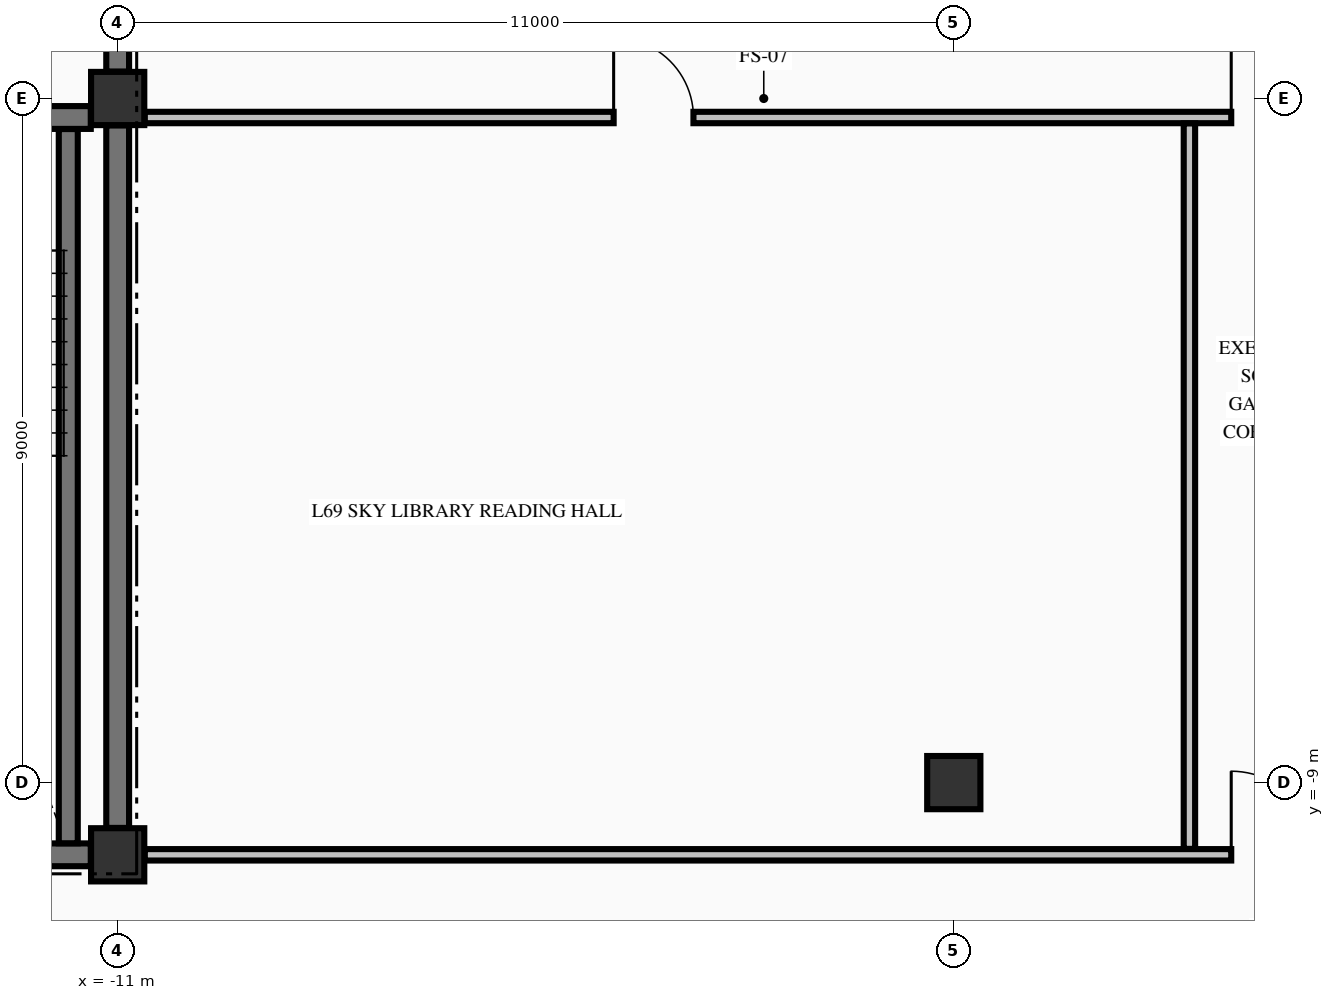
"""IFC4 building model, lengths in metres.
Left out: names, types, materials, properties, quantities, classifications, styles, units other than length and angle.
Written with IfcOpenShell. Run it as: python <this file> out.ifc"""

import sys

from ifc_helpers import new_model, si_unit, direction, frame, frame_2d, origin, origin_2d, place, context, subcontext, project, spatial, rectangle, extrude, element, fill, save


model = new_model("IFC4")
c1 = context("Model", 3, precision=1e-05, world=origin(), true_north=direction((0.0, 1.0)))
c2 = subcontext(c1, "Body", "Model", "MODEL_VIEW")
j1 = project(units=[si_unit("LENGTHUNIT", "METRE"), si_unit("PLANEANGLEUNIT", "RADIAN")], contexts=[c1])
p1 = place(None, origin())
s1 = spatial("IfcSite", under=j1, at=p1, CompositionType="ELEMENT")
p2 = place(p1, origin())
s2 = spatial("IfcBuilding", under=s1, at=p2, CompositionType="ELEMENT")
p3 = place(p2, frame((0.0, 0.0, 260.89)))
s3 = spatial("IfcBuildingStorey", under=s2, at=p3, CompositionType="ELEMENT", Elevation=260.89)
for number, where, z_axis, x_axis in (
    (1, (-11.0, -9.95, -0.25), (0.0, 0.0, 1.0), (1.0, 0.0, 0.0)),
    (2, (-11.0, 0.0, -0.25), (0.0, 0.0, 1.0), (1.0, 0.0, 0.0)),
    (3, (0.0, -9.0, -0.25), (0.0, 0.0, 1.0), (1.0, 0.0, 0.0)),
):
    element("IfcColumn", number, at=place(p3, frame(where, z_axis=z_axis, x_axis=x_axis)), inside=s3, PredefinedType="COLUMN", context=c2, shape_type="SweptSolid", body=[
        extrude(rectangle(XDim=0.7, YDim=0.7, at=origin_2d()), origin(), (0.0, 0.0, 1.0), 3.23),
    ])
p4 = place(p3, frame((-14.7, -9.95, 0.0), z_axis=(0.0, 0.0, 1.0), x_axis=(1.0, 0.0, 0.0)))
e4 = element("IfcWall", 4, at=p4, inside=s3, PredefinedType="SHEAR", context=c2, shape_type="SweptSolid", body=[
    extrude(rectangle(XDim=3.346, YDim=0.3, at=frame_2d((1.673, 0.0))), origin(), (0.0, 0.0, 1.0), 2.98),
])
p5 = place(p3, frame((-19.646, -0.25, 0.0), z_axis=(0.0, 0.0, 1.0), x_axis=(1.0, 0.0, 0.0)))
e5 = element("IfcWall", 5, at=p5, inside=s3, PredefinedType="SHEAR", context=c2, shape_type="SweptSolid", body=[
    extrude(rectangle(XDim=8.292, YDim=0.3, at=frame_2d((4.146, 0.0))), origin(), (0.0, 0.0, 1.0), 2.98),
])
p6 = place(p5, frame((5.946, 0.0, 0.0)))
e6 = element("IfcOpeningElement", 6, at=p6, cuts=e5, PredefinedType="OPENING", context=c2, shape_type="SweptSolid", body=[
    extrude(rectangle(XDim=1.1, YDim=2.15, at=frame_2d((0.55, 1.075))), frame((0.0, 0.16, 0.0), z_axis=(0.0, -1.0, 0.0), x_axis=(1.0, 0.0, 0.0)), (0.0, 0.0, 1.0), 0.32),
])
p7 = place(p3, frame((-10.644, -9.95, 0.0), z_axis=(0.0, 0.0, 1.0), x_axis=(1.0, 0.0, 0.0)))
e7 = element("IfcWall", 7, at=p7, inside=s3, PredefinedType="PARTITIONING", context=c2, shape_type="SweptSolid", body=[
    extrude(rectangle(XDim=21.288, YDim=0.15, at=frame_2d((10.644, 0.0))), origin(), (0.0, 0.0, 1.0), 2.98),
])
p8 = place(p7, frame((14.294, 0.0, 0.0)))
e8 = element("IfcOpeningElement", 8, at=p8, cuts=e7, PredefinedType="OPENING", context=c2, shape_type="SweptSolid", body=[
    extrude(rectangle(XDim=1.1, YDim=2.15, at=frame_2d((0.55, 1.075))), frame((0.0, 0.085, 0.0), z_axis=(0.0, -1.0, 0.0), x_axis=(1.0, 0.0, 0.0)), (0.0, 0.0, 1.0), 0.17),
])
p9 = place(p7, frame((19.719, 0.0, 0.0)))
e9 = element("IfcOpeningElement", 9, at=p9, cuts=e7, PredefinedType="OPENING", context=c2, shape_type="SweptSolid", body=[
    extrude(rectangle(XDim=0.95, YDim=2.15, at=frame_2d((0.475, 1.075))), frame((0.0, 0.085, 0.0), z_axis=(0.0, -1.0, 0.0), x_axis=(1.0, 0.0, 0.0)), (0.0, 0.0, 1.0), 0.17),
])
p10 = place(p3, frame((-10.644, -0.25, 0.0), z_axis=(0.0, 0.0, 1.0), x_axis=(1.0, 0.0, 0.0)))
e10 = element("IfcWall", 10, at=p10, inside=s3, PredefinedType="PARTITIONING", context=c2, shape_type="SweptSolid", body=[
    extrude(rectangle(XDim=21.288, YDim=0.15, at=frame_2d((10.644, 0.0))), origin(), (0.0, 0.0, 1.0), 2.98),
])
p11 = place(p10, frame((14.294, 0.0, 0.0)))
e11 = element("IfcOpeningElement", 11, at=p11, cuts=e10, PredefinedType="OPENING", context=c2, shape_type="SweptSolid", body=[
    extrude(rectangle(XDim=1.1, YDim=2.15, at=frame_2d((0.55, 1.075))), frame((0.0, 0.085, 0.0), z_axis=(0.0, -1.0, 0.0), x_axis=(1.0, 0.0, 0.0)), (0.0, 0.0, 1.0), 0.17),
])
p12 = place(p10, frame((6.169, 0.0, 0.0)))
e12 = element("IfcOpeningElement", 12, at=p12, cuts=e10, PredefinedType="OPENING", context=c2, shape_type="SweptSolid", body=[
    extrude(rectangle(XDim=1.05, YDim=2.15, at=frame_2d((0.525, 1.075))), frame((0.0, 0.085, 0.0), z_axis=(0.0, -1.0, 0.0), x_axis=(1.0, 0.0, 0.0)), (0.0, 0.0, 1.0), 0.17),
])
p13 = place(p10, frame((18.319, 0.0, 0.0)))
e13 = element("IfcOpeningElement", 13, at=p13, cuts=e10, PredefinedType="OPENING", context=c2, shape_type="SweptSolid", body=[
    extrude(rectangle(XDim=0.95, YDim=2.15, at=frame_2d((0.475, 1.075))), frame((0.0, 0.085, 0.0), z_axis=(0.0, -1.0, 0.0), x_axis=(1.0, 0.0, 0.0)), (0.0, 0.0, 1.0), 0.17),
])
p14 = place(p3, frame((-11.65, -9.798, 0.0), z_axis=(0.0, 0.0, 1.0), x_axis=(0.0, 1.0, 0.0)))
e14 = element("IfcWall", 14, at=p14, inside=s3, PredefinedType="SOLIDWALL", context=c2, shape_type="SweptSolid", body=[
    extrude(rectangle(XDim=9.396, YDim=0.25, at=frame_2d((4.698, 0.0))), origin(), (0.0, 0.0, 1.0), 2.98),
])
p15 = place(p3, frame((-11.0, -9.596, 0.0), z_axis=(0.0, 0.0, 1.0), x_axis=(0.0, 1.0, 0.0)))
e15 = element("IfcWall", 15, at=p15, inside=s3, PredefinedType="SHEAR", context=c2, shape_type="SweptSolid", body=[
    extrude(rectangle(XDim=9.242, YDim=0.3, at=frame_2d((4.621, 0.0))), origin(), (0.0, 0.0, 1.0), 2.98),
])
p16 = place(p3, frame((-11.0, 0.354, 0.0), z_axis=(0.0, 0.0, 1.0), x_axis=(0.0, 1.0, 0.0)))
e16 = element("IfcWall", 16, at=p16, inside=s3, PredefinedType="SHEAR", context=c2, shape_type="SweptSolid", body=[
    extrude(rectangle(XDim=2.394, YDim=0.3, at=frame_2d((1.197, 0.0))), origin(), (0.0, 0.0, 1.0), 2.98),
])
p17 = place(p16, frame((0.746, 0.0, 0.0)))
e17 = element("IfcOpeningElement", 17, at=p17, cuts=e16, PredefinedType="OPENING", context=c2, shape_type="SweptSolid", body=[
    extrude(rectangle(XDim=1.1, YDim=2.15, at=frame_2d((0.55, 1.075))), frame((0.0, 0.16, 0.0), z_axis=(0.0, -1.0, 0.0), x_axis=(1.0, 0.0, 0.0)), (0.0, 0.0, 1.0), 0.32),
])
p18 = place(p3, frame((3.1, -9.872, 0.0), z_axis=(0.0, 0.0, 1.0), x_axis=(0.0, 1.0, 0.0)))
e18 = element("IfcWall", 18, at=p18, inside=s3, PredefinedType="PARTITIONING", context=c2, shape_type="SweptSolid", body=[
    extrude(rectangle(XDim=9.544, YDim=0.15, at=frame_2d((4.772, 0.0))), origin(), (0.0, 0.0, 1.0), 2.98),
])
p19 = place(p8, origin())
e19 = element("IfcDoor", 19, at=p19, inside=s3, OperationType="SINGLE_SWING_LEFT", PredefinedType="DOOR", context=c2, shape_type="SweptSolid", body=[
    extrude(rectangle(XDim=1.1, YDim=2.15, at=frame_2d((0.55, 1.075))), frame((0.0, 0.025, 0.0), z_axis=(0.0, -1.0, 0.0), x_axis=(1.0, 0.0, 0.0)), (0.0, 0.0, 1.0), 0.05),
])
fill(e8, e19)
p20 = place(p11, origin())
e20 = element("IfcDoor", 20, at=p20, inside=s3, OperationType="SINGLE_SWING_LEFT", PredefinedType="DOOR", context=c2, shape_type="SweptSolid", body=[
    extrude(rectangle(XDim=1.1, YDim=2.15, at=frame_2d((0.55, 1.075))), frame((0.0, 0.025, 0.0), z_axis=(0.0, -1.0, 0.0), x_axis=(1.0, 0.0, 0.0)), (0.0, 0.0, 1.0), 0.05),
])
fill(e11, e20)
p21 = place(p12, origin())
e21 = element("IfcDoor", 21, at=p21, inside=s3, OperationType="SINGLE_SWING_LEFT", PredefinedType="DOOR", context=c2, shape_type="SweptSolid", body=[
    extrude(rectangle(XDim=1.05, YDim=2.15, at=frame_2d((0.525, 1.075))), frame((0.0, 0.025, 0.0), z_axis=(0.0, -1.0, 0.0), x_axis=(1.0, 0.0, 0.0)), (0.0, 0.0, 1.0), 0.05),
])
fill(e12, e21)
save(model, sys.argv[1])
